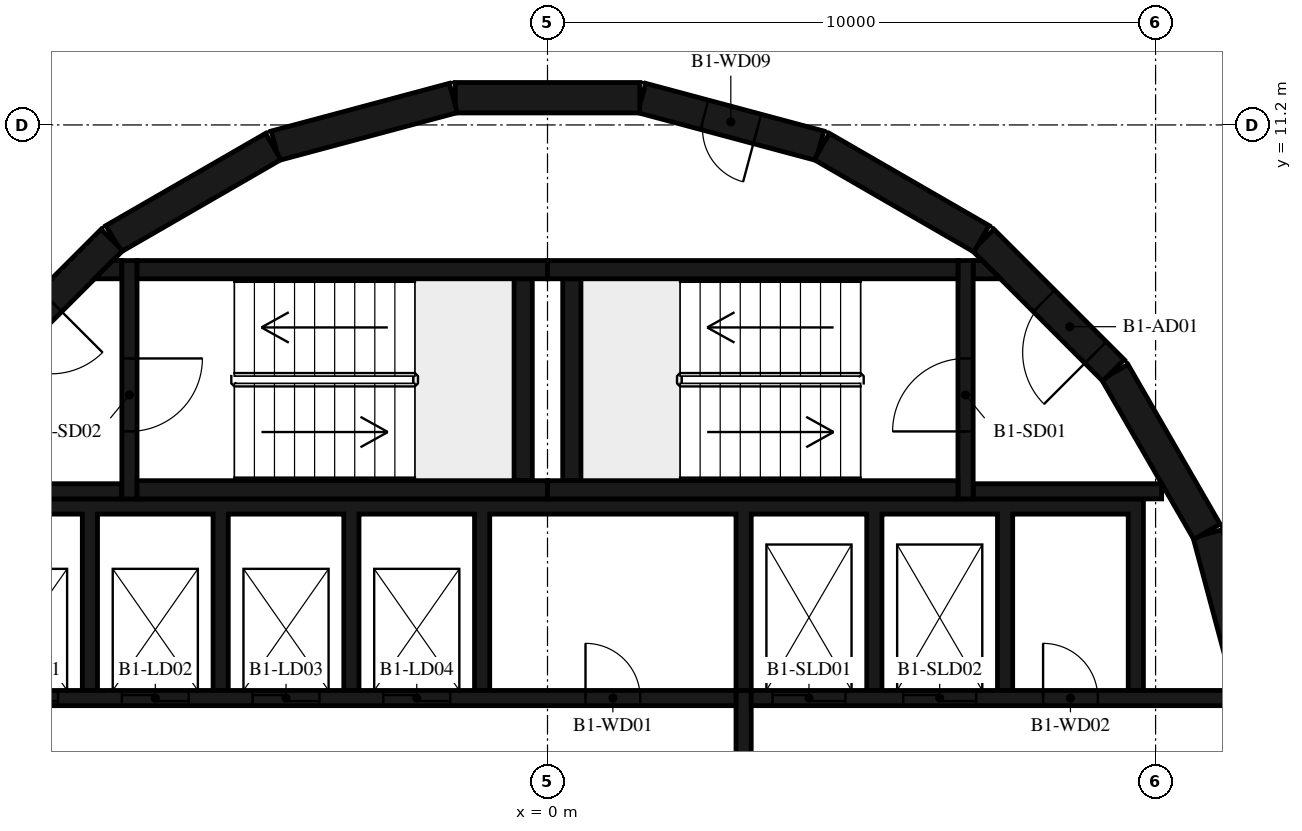
"""IFC4 building model, lengths in metres.
Left out: names, types, materials, properties, quantities, classifications, styles, units other than length and angle.
Written with IfcOpenShell. Run it as: python <this file> out.ifc"""

import sys

from ifc_helpers import new_model, si_unit, direction, frame, frame_2d, origin, place, context, subcontext, project, spatial, polyline, rectangle, outline, extrude, element, fill, save


model = new_model("IFC4")
c1 = context("Model", 3, precision=1e-05, world=origin(), true_north=direction((0.0, 1.0)))
c2 = subcontext(c1, "Body", "Model", "MODEL_VIEW")
j1 = project(units=[si_unit("LENGTHUNIT", "METRE"), si_unit("PLANEANGLEUNIT", "RADIAN")], contexts=[c1])
p1 = place(None, origin())
s1 = spatial("IfcSite", under=j1, at=p1, CompositionType="ELEMENT")
p2 = place(p1, origin())
s2 = spatial("IfcBuilding", under=s1, at=p2, CompositionType="ELEMENT")
p3 = place(p2, frame((0.0, 0.0, -4.2)))
s3 = spatial("IfcBuildingStorey", under=s2, at=p3, CompositionType="ELEMENT", Elevation=-4.2)
for number, where, z_axis, x_axis in (
    (1, (11.643, 1.55, 0.0), (0.0, 0.0, 1.0), (-0.259, 0.966, 0.0)),
    (2, (10.845, 4.51, 0.0), (0.0, 0.0, 1.0), (-0.5, 0.866, 0.0)),
):
    element("IfcWall", number, at=place(p3, frame(where, z_axis=z_axis, x_axis=x_axis)), inside=s3, PredefinedType="SHEAR", context=c2, shape_type="SweptSolid", body=[
        extrude(rectangle(XDim=3.033, YDim=0.5, at=frame_2d((1.516, 0.0))), origin(), (0.0, 0.0, 1.0), 3.78),
    ])
p4 = place(p3, frame((9.308, 7.164, 0.0), z_axis=(0.0, 0.0, 1.0), x_axis=(-0.707106781187, 0.707106781187, 0.0)))
e3 = element("IfcWall", 3, at=p4, inside=s3, PredefinedType="SHEAR", context=c2, shape_type="SweptSolid", body=[
    extrude(rectangle(XDim=3.032, YDim=0.5, at=frame_2d((1.516, 0.0))), origin(), (0.0, 0.0, 1.0), 3.78),
])
p5 = place(p4, frame((0.416, 0.0, 0.0)))
e4 = element("IfcOpeningElement", 4, at=p5, cuts=e3, PredefinedType="OPENING", context=c2, shape_type="SweptSolid", body=[
    extrude(rectangle(XDim=1.2, YDim=2.1, at=frame_2d((0.6, 1.05))), frame((0.0, 0.26, 0.0), z_axis=(0.0, -1.0, 0.0), x_axis=(1.0, 0.0, 0.0)), (0.0, 0.0, 1.0), 0.52),
])
p6 = place(p3, frame((7.137, 9.329, 0.0), z_axis=(0.0, 0.0, 1.0), x_axis=(-0.865975092491, 0.500087131594, 0.0)))
e5 = element("IfcWall", 5, at=p6, inside=s3, PredefinedType="SHEAR", context=c2, shape_type="SweptSolid", body=[
    extrude(rectangle(XDim=3.033, YDim=0.5, at=frame_2d((1.516, 0.0))), origin(), (0.0, 0.0, 1.0), 3.78),
])
p7 = place(p3, frame((4.479, 10.858, 0.0), z_axis=(0.0, 0.0, 1.0), x_axis=(-0.965948410781, 0.258734743916, 0.0)))
e6 = element("IfcWall", 6, at=p7, inside=s3, PredefinedType="SHEAR", context=c2, shape_type="SweptSolid", body=[
    extrude(rectangle(XDim=3.033, YDim=0.5, at=frame_2d((1.516, 0.0))), origin(), (0.0, 0.0, 1.0), 3.78),
])
p8 = place(p7, frame((1.066, 0.0, 0.0)))
e7 = element("IfcOpeningElement", 7, at=p8, cuts=e6, PredefinedType="OPENING", context=c2, shape_type="SweptSolid", body=[
    extrude(rectangle(XDim=0.9, YDim=2.1, at=frame_2d((0.45, 1.05))), frame((0.0, 0.26, 0.0), z_axis=(0.0, -1.0, 0.0), x_axis=(1.0, 0.0, 0.0)), (0.0, 0.0, 1.0), 0.52),
])
for number, where, z_axis, x_axis in (
    (8, (1.516, 11.647, 0.0), (0.0, 0.0, 1.0), (-1.0, 0.0, 0.0)),
    (9, (-1.55, 11.643, 0.0), (0.0, 0.0, 1.0), (-0.966, -0.259, 0.0)),
    (10, (-4.51, 10.845, 0.0), (0.0, 0.0, 1.0), (-0.866, -0.5, 0.0)),
):
    element("IfcWall", number, at=place(p3, frame(where, z_axis=z_axis, x_axis=x_axis)), inside=s3, PredefinedType="SHEAR", context=c2, shape_type="SweptSolid", body=[
        extrude(rectangle(XDim=3.033, YDim=0.5, at=frame_2d((1.516, 0.0))), origin(), (0.0, 0.0, 1.0), 3.78),
    ])
p9 = place(p3, frame((-7.164, 9.308, 0.0), z_axis=(0.0, 0.0, 1.0), x_axis=(-0.707106781187, -0.707106781187, 0.0)))
e11 = element("IfcWall", 11, at=p9, inside=s3, PredefinedType="SHEAR", context=c2, shape_type="SweptSolid", body=[
    extrude(rectangle(XDim=3.032, YDim=0.5, at=frame_2d((1.516, 0.0))), origin(), (0.0, 0.0, 1.0), 3.78),
])
p10 = place(p9, frame((1.416, 0.0, 0.0)))
e12 = element("IfcOpeningElement", 12, at=p10, cuts=e11, PredefinedType="OPENING", context=c2, shape_type="SweptSolid", body=[
    extrude(rectangle(XDim=1.2, YDim=2.1, at=frame_2d((0.6, 1.05))), frame((0.0, 0.26, 0.0), z_axis=(0.0, -1.0, 0.0), x_axis=(1.0, 0.0, 0.0)), (0.0, 0.0, 1.0), 0.52),
])
for number, where, z_axis, x_axis in (
    (13, (0.0, 5.2, 0.0), (0.0, 0.0, 1.0), (1.0, 0.0, 0.0)),
    (14, (0.0, 8.82, 0.0), (0.0, 0.0, 1.0), (1.0, 0.0, 0.0)),
):
    element("IfcWall", number, at=place(p3, frame(where, z_axis=z_axis, x_axis=x_axis)), inside=s3, PredefinedType="SHEAR", context=c2, shape_type="SweptSolid", body=[
        extrude(rectangle(XDim=6.75, YDim=0.3, at=frame_2d((3.375, 0.0))), origin(), (0.0, 0.0, 1.0), 3.78),
    ])
p11 = place(p3, frame((0.4, 5.35, 0.0), z_axis=(0.0, 0.0, 1.0), x_axis=(0.0, 1.0, 0.0)))
e15 = element("IfcWall", 15, at=p11, inside=s3, PredefinedType="SHEAR", context=c2, shape_type="SweptSolid", body=[
    extrude(rectangle(XDim=3.32, YDim=0.3, at=frame_2d((1.66, 0.0))), origin(), (0.0, 0.0, 1.0), 3.78),
])
p12 = place(p3, frame((6.875, 5.05, 0.0), z_axis=(0.0, 0.0, 1.0), x_axis=(0.0, 1.0, 0.0)))
e16 = element("IfcWall", 16, at=p12, inside=s3, PredefinedType="SHEAR", context=c2, shape_type="SweptSolid", body=[
    extrude(rectangle(XDim=3.92, YDim=0.25, at=frame_2d((1.96, 0.0))), origin(), (0.0, 0.0, 1.0), 3.78),
])
p13 = place(p12, frame((1.11, 0.0, 0.0)))
e17 = element("IfcOpeningElement", 17, at=p13, cuts=e16, PredefinedType="OPENING", context=c2, shape_type="SweptSolid", body=[
    extrude(rectangle(XDim=1.2, YDim=2.1, at=frame_2d((0.6, 1.05))), frame((0.0, 0.135, 0.0), z_axis=(0.0, -1.0, 0.0), x_axis=(1.0, 0.0, 0.0)), (0.0, 0.0, 1.0), 0.27),
])
p14 = place(p3, frame((7.0, 5.175, 0.0), z_axis=(0.0, 0.0, 1.0), x_axis=(1.0, 0.0, 0.0)))
e18 = element("IfcWall", 18, at=p14, inside=s3, PredefinedType="SHEAR", context=c2, shape_type="SweptSolid", body=[
    extrude(rectangle(XDim=3.1, YDim=0.25, at=frame_2d((1.55, 0.0))), origin(), (0.0, 0.0, 1.0), 3.78),
])
p15 = place(p3, origin())
e19 = element("IfcWall", 19, at=p15, inside=s3, PredefinedType="SHEAR", context=c2, shape_type="SweptSolid", body=[
    extrude(outline(polyline([(7.448, 8.67), (7.0, 8.67), (7.0, 8.97), (7.148, 8.97), (7.448, 8.67)])), origin(), (0.0, 0.0, 1.0), 3.78),
])
for number, where, z_axis, x_axis in (
    (20, (-6.75, 5.2, 0.0), (0.0, 0.0, 1.0), (1.0, 0.0, 0.0)),
    (21, (-6.75, 8.82, 0.0), (0.0, 0.0, 1.0), (1.0, 0.0, 0.0)),
):
    element("IfcWall", number, at=place(p3, frame(where, z_axis=z_axis, x_axis=x_axis)), inside=s3, PredefinedType="SHEAR", context=c2, shape_type="SweptSolid", body=[
        extrude(rectangle(XDim=6.75, YDim=0.3, at=frame_2d((3.375, 0.0))), origin(), (0.0, 0.0, 1.0), 3.78),
    ])
p16 = place(p3, frame((-0.4, 5.35, 0.0), z_axis=(0.0, 0.0, 1.0), x_axis=(0.0, 1.0, 0.0)))
e22 = element("IfcWall", 22, at=p16, inside=s3, PredefinedType="SHEAR", context=c2, shape_type="SweptSolid", body=[
    extrude(rectangle(XDim=3.32, YDim=0.3, at=frame_2d((1.66, 0.0))), origin(), (0.0, 0.0, 1.0), 3.78),
])
p17 = place(p3, frame((-6.875, 8.97, 0.0), z_axis=(0.0, 0.0, 1.0), x_axis=(0.0, -1.0, 0.0)))
e23 = element("IfcWall", 23, at=p17, inside=s3, PredefinedType="SHEAR", context=c2, shape_type="SweptSolid", body=[
    extrude(rectangle(XDim=3.92, YDim=0.25, at=frame_2d((1.96, 0.0))), origin(), (0.0, 0.0, 1.0), 3.78),
])
p18 = place(p17, frame((1.61, 0.0, 0.0)))
e24 = element("IfcOpeningElement", 24, at=p18, cuts=e23, PredefinedType="OPENING", context=c2, shape_type="SweptSolid", body=[
    extrude(rectangle(XDim=1.2, YDim=2.1, at=frame_2d((0.6, 1.05))), frame((0.0, 0.135, 0.0), z_axis=(0.0, -1.0, 0.0), x_axis=(1.0, 0.0, 0.0)), (0.0, 0.0, 1.0), 0.27),
])
p19 = place(p3, frame((-7.0, 5.175, 0.0), z_axis=(0.0, 0.0, 1.0), x_axis=(-1.0, 0.0, 0.0)))
e25 = element("IfcWall", 25, at=p19, inside=s3, PredefinedType="SHEAR", context=c2, shape_type="SweptSolid", body=[
    extrude(rectangle(XDim=3.1, YDim=0.25, at=frame_2d((1.55, 0.0))), origin(), (0.0, 0.0, 1.0), 3.78),
])
p20 = place(p3, origin())
e26 = element("IfcWall", 26, at=p20, inside=s3, PredefinedType="SHEAR", context=c2, shape_type="SweptSolid", body=[
    extrude(outline(polyline([(-7.148, 8.97), (-7.0, 8.97), (-7.0, 8.67), (-7.448, 8.67), (-7.148, 8.97)])), origin(), (0.0, 0.0, 1.0), 3.78),
])
p21 = place(p3, origin())
e27 = element("IfcWall", 27, at=p21, inside=s3, PredefinedType="SHEAR", context=c2, shape_type="SweptSolid", body=[
    extrude(outline(polyline([(-9.55, 4.8), (-7.65, 4.8), (-7.65, 1.9), (-7.4, 1.9), (-7.4, 4.8), (-5.5, 4.8), (-5.5, 1.9), (-5.25, 1.9), (-5.25, 4.8), (-3.35, 4.8), (-3.35, 1.9), (-3.1, 1.9), (-3.1, 4.8), (-1.2, 4.8), (-1.2, 1.9), (-0.95, 1.9), (-0.95, 4.8), (3.1, 4.8), (3.1, 1.9), (3.35, 1.9), (3.35, 4.8), (5.25, 4.8), (5.25, 1.9), (5.5, 1.9), (5.5, 4.8), (7.4, 4.8), (7.4, 1.9), (7.65, 1.9), (7.65, 4.8), (9.55, 4.8), (9.55, 1.9), (9.8, 1.9), (9.8, 4.8), (9.8, 5.05), (-9.8, 5.05), (-9.8, 4.8), (-9.8, 1.9), (-9.55, 1.9), (-9.55, 4.8)])), origin(), (0.0, 0.0, 1.0), 3.78),
])
p22 = place(p3, frame((-11.28, 1.775, 0.0), z_axis=(0.0, 0.0, 1.0), x_axis=(1.0, 0.0, 0.0)))
e28 = element("IfcWall", 28, at=p22, inside=s3, PredefinedType="SHEAR", context=c2, shape_type="SweptSolid", body=[
    extrude(rectangle(XDim=14.38, YDim=0.25, at=frame_2d((7.19, 0.0))), origin(), (0.0, 0.0, 1.0), 3.78),
])
p23 = place(p22, frame((2.13, 0.0, 0.0)))
e29 = element("IfcOpeningElement", 29, at=p23, cuts=e28, PredefinedType="OPENING", context=c2, shape_type="SweptSolid", body=[
    extrude(rectangle(XDim=1.1, YDim=2.1, at=frame_2d((0.55, 1.05))), frame((0.0, 0.135, 0.0), z_axis=(0.0, -1.0, 0.0), x_axis=(1.0, 0.0, 0.0)), (0.0, 0.0, 1.0), 0.27),
])
p24 = place(p22, frame((4.28, 0.0, 0.0)))
e30 = element("IfcOpeningElement", 30, at=p24, cuts=e28, PredefinedType="OPENING", context=c2, shape_type="SweptSolid", body=[
    extrude(rectangle(XDim=1.1, YDim=2.1, at=frame_2d((0.55, 1.05))), frame((0.0, 0.135, 0.0), z_axis=(0.0, -1.0, 0.0), x_axis=(1.0, 0.0, 0.0)), (0.0, 0.0, 1.0), 0.27),
])
p25 = place(p22, frame((6.43, 0.0, 0.0)))
e31 = element("IfcOpeningElement", 31, at=p25, cuts=e28, PredefinedType="OPENING", context=c2, shape_type="SweptSolid", body=[
    extrude(rectangle(XDim=1.1, YDim=2.1, at=frame_2d((0.55, 1.05))), frame((0.0, 0.135, 0.0), z_axis=(0.0, -1.0, 0.0), x_axis=(1.0, 0.0, 0.0)), (0.0, 0.0, 1.0), 0.27),
])
p26 = place(p22, frame((8.58, 0.0, 0.0)))
e32 = element("IfcOpeningElement", 32, at=p26, cuts=e28, PredefinedType="OPENING", context=c2, shape_type="SweptSolid", body=[
    extrude(rectangle(XDim=1.1, YDim=2.1, at=frame_2d((0.55, 1.05))), frame((0.0, 0.135, 0.0), z_axis=(0.0, -1.0, 0.0), x_axis=(1.0, 0.0, 0.0)), (0.0, 0.0, 1.0), 0.27),
])
p27 = place(p22, frame((11.905, 0.0, 0.0)))
e33 = element("IfcOpeningElement", 33, at=p27, cuts=e28, PredefinedType="OPENING", context=c2, shape_type="SweptSolid", body=[
    extrude(rectangle(XDim=0.9, YDim=2.1, at=frame_2d((0.45, 1.05))), frame((0.0, 0.135, 0.0), z_axis=(0.0, -1.0, 0.0), x_axis=(1.0, 0.0, 0.0)), (0.0, 0.0, 1.0), 0.27),
])
p28 = place(p3, frame((3.35, 1.775, 0.0), z_axis=(0.0, 0.0, 1.0), x_axis=(1.0, 0.0, 0.0)))
e34 = element("IfcWall", 34, at=p28, inside=s3, PredefinedType="SHEAR", context=c2, shape_type="SweptSolid", body=[
    extrude(rectangle(XDim=7.93, YDim=0.25, at=frame_2d((3.965, 0.0))), origin(), (0.0, 0.0, 1.0), 3.78),
])
p29 = place(p28, frame((0.35, 0.0, 0.0)))
e35 = element("IfcOpeningElement", 35, at=p29, cuts=e34, PredefinedType="OPENING", context=c2, shape_type="SweptSolid", body=[
    extrude(rectangle(XDim=1.2, YDim=2.4, at=frame_2d((0.6, 1.2))), frame((0.0, 0.135, 0.0), z_axis=(0.0, -1.0, 0.0), x_axis=(1.0, 0.0, 0.0)), (0.0, 0.0, 1.0), 0.27),
])
p30 = place(p28, frame((2.5, 0.0, 0.0)))
e36 = element("IfcOpeningElement", 36, at=p30, cuts=e34, PredefinedType="OPENING", context=c2, shape_type="SweptSolid", body=[
    extrude(rectangle(XDim=1.2, YDim=2.4, at=frame_2d((0.6, 1.2))), frame((0.0, 0.135, 0.0), z_axis=(0.0, -1.0, 0.0), x_axis=(1.0, 0.0, 0.0)), (0.0, 0.0, 1.0), 0.27),
])
p31 = place(p28, frame((4.8, 0.0, 0.0)))
e37 = element("IfcOpeningElement", 37, at=p31, cuts=e34, PredefinedType="OPENING", context=c2, shape_type="SweptSolid", body=[
    extrude(rectangle(XDim=0.9, YDim=2.1, at=frame_2d((0.45, 1.05))), frame((0.0, 0.135, 0.0), z_axis=(0.0, -1.0, 0.0), x_axis=(1.0, 0.0, 0.0)), (0.0, 0.0, 1.0), 0.27),
])
p32 = place(p3, frame((3.225, -1.9, 0.0), z_axis=(0.0, 0.0, 1.0), x_axis=(0.0, 1.0, 0.0)))
e38 = element("IfcWall", 38, at=p32, inside=s3, PredefinedType="SHEAR", context=c2, shape_type="SweptSolid", body=[
    extrude(rectangle(XDim=3.8, YDim=0.25, at=frame_2d((1.9, 0.0))), origin(), (0.0, 0.0, 1.0), 3.78),
])
p33 = place(p13, origin())
e39 = element("IfcDoor", 39, at=p33, inside=s3, OperationType="SINGLE_SWING_LEFT", PredefinedType="DOOR", context=c2, shape_type="SweptSolid", body=[
    extrude(rectangle(XDim=1.2, YDim=2.1, at=frame_2d((0.6, 1.05))), frame((0.0, 0.025, 0.0), z_axis=(0.0, -1.0, 0.0), x_axis=(1.0, 0.0, 0.0)), (0.0, 0.0, 1.0), 0.05),
])
fill(e17, e39)
p34 = place(p5, origin())
e40 = element("IfcDoor", 40, at=p34, inside=s3, OperationType="SINGLE_SWING_RIGHT", PredefinedType="DOOR", context=c2, shape_type="SweptSolid", body=[
    extrude(rectangle(XDim=1.2, YDim=2.1, at=frame_2d((0.6, 1.05))), frame((0.0, 0.025, 0.0), z_axis=(0.0, -1.0, 0.0), x_axis=(1.0, 0.0, 0.0)), (0.0, 0.0, 1.0), 0.05),
])
fill(e4, e40)
p35 = place(p18, origin())
e41 = element("IfcDoor", 41, at=p35, inside=s3, OperationType="SINGLE_SWING_LEFT", PredefinedType="DOOR", context=c2, shape_type="SweptSolid", body=[
    extrude(rectangle(XDim=1.2, YDim=2.1, at=frame_2d((0.6, 1.05))), frame((0.0, 0.025, 0.0), z_axis=(0.0, -1.0, 0.0), x_axis=(1.0, 0.0, 0.0)), (0.0, 0.0, 1.0), 0.05),
])
fill(e24, e41)
p36 = place(p10, origin())
e42 = element("IfcDoor", 42, at=p36, inside=s3, OperationType="SINGLE_SWING_RIGHT", PredefinedType="DOOR", context=c2, shape_type="SweptSolid", body=[
    extrude(rectangle(XDim=1.2, YDim=2.1, at=frame_2d((0.6, 1.05))), frame((0.0, 0.025, 0.0), z_axis=(0.0, -1.0, 0.0), x_axis=(1.0, 0.0, 0.0)), (0.0, 0.0, 1.0), 0.05),
])
fill(e12, e42)
p37 = place(p23, origin())
e43 = element("IfcDoor", 43, at=p37, inside=s3, OperationType="DOUBLE_DOOR_SLIDING", PredefinedType="DOOR", context=c2, shape_type="SweptSolid", body=[
    extrude(rectangle(XDim=1.1, YDim=2.1, at=frame_2d((0.55, 1.05))), frame((0.0, 0.025, 0.0), z_axis=(0.0, -1.0, 0.0), x_axis=(1.0, 0.0, 0.0)), (0.0, 0.0, 1.0), 0.05),
])
fill(e29, e43)
p38 = place(p24, origin())
e44 = element("IfcDoor", 44, at=p38, inside=s3, OperationType="DOUBLE_DOOR_SLIDING", PredefinedType="DOOR", context=c2, shape_type="SweptSolid", body=[
    extrude(rectangle(XDim=1.1, YDim=2.1, at=frame_2d((0.55, 1.05))), frame((0.0, 0.025, 0.0), z_axis=(0.0, -1.0, 0.0), x_axis=(1.0, 0.0, 0.0)), (0.0, 0.0, 1.0), 0.05),
])
fill(e30, e44)
p39 = place(p25, origin())
e45 = element("IfcDoor", 45, at=p39, inside=s3, OperationType="DOUBLE_DOOR_SLIDING", PredefinedType="DOOR", context=c2, shape_type="SweptSolid", body=[
    extrude(rectangle(XDim=1.1, YDim=2.1, at=frame_2d((0.55, 1.05))), frame((0.0, 0.025, 0.0), z_axis=(0.0, -1.0, 0.0), x_axis=(1.0, 0.0, 0.0)), (0.0, 0.0, 1.0), 0.05),
])
fill(e31, e45)
p40 = place(p26, origin())
e46 = element("IfcDoor", 46, at=p40, inside=s3, OperationType="DOUBLE_DOOR_SLIDING", PredefinedType="DOOR", context=c2, shape_type="SweptSolid", body=[
    extrude(rectangle(XDim=1.1, YDim=2.1, at=frame_2d((0.55, 1.05))), frame((0.0, 0.025, 0.0), z_axis=(0.0, -1.0, 0.0), x_axis=(1.0, 0.0, 0.0)), (0.0, 0.0, 1.0), 0.05),
])
fill(e32, e46)
p41 = place(p29, origin())
e47 = element("IfcDoor", 47, at=p41, inside=s3, OperationType="DOUBLE_DOOR_SLIDING", PredefinedType="DOOR", context=c2, shape_type="SweptSolid", body=[
    extrude(rectangle(XDim=1.2, YDim=2.4, at=frame_2d((0.6, 1.2))), frame((0.0, 0.025, 0.0), z_axis=(0.0, -1.0, 0.0), x_axis=(1.0, 0.0, 0.0)), (0.0, 0.0, 1.0), 0.05),
])
fill(e35, e47)
p42 = place(p30, origin())
e48 = element("IfcDoor", 48, at=p42, inside=s3, OperationType="DOUBLE_DOOR_SLIDING", PredefinedType="DOOR", context=c2, shape_type="SweptSolid", body=[
    extrude(rectangle(XDim=1.2, YDim=2.4, at=frame_2d((0.6, 1.2))), frame((0.0, 0.025, 0.0), z_axis=(0.0, -1.0, 0.0), x_axis=(1.0, 0.0, 0.0)), (0.0, 0.0, 1.0), 0.05),
])
fill(e36, e48)
p43 = place(p27, origin())
e49 = element("IfcDoor", 49, at=p43, inside=s3, OperationType="SINGLE_SWING_RIGHT", PredefinedType="DOOR", context=c2, shape_type="SweptSolid", body=[
    extrude(rectangle(XDim=0.9, YDim=2.1, at=frame_2d((0.45, 1.05))), frame((0.0, 0.025, 0.0), z_axis=(0.0, -1.0, 0.0), x_axis=(1.0, 0.0, 0.0)), (0.0, 0.0, 1.0), 0.05),
])
fill(e33, e49)
p44 = place(p31, origin())
e50 = element("IfcDoor", 50, at=p44, inside=s3, OperationType="SINGLE_SWING_LEFT", PredefinedType="DOOR", context=c2, shape_type="SweptSolid", body=[
    extrude(rectangle(XDim=0.9, YDim=2.1, at=frame_2d((0.45, 1.05))), frame((0.0, 0.025, 0.0), z_axis=(0.0, -1.0, 0.0), x_axis=(1.0, 0.0, 0.0)), (0.0, 0.0, 1.0), 0.05),
])
fill(e37, e50)
p45 = place(p8, origin())
e51 = element("IfcDoor", 51, at=p45, inside=s3, OperationType="SINGLE_SWING_RIGHT", PredefinedType="DOOR", context=c2, shape_type="SweptSolid", body=[
    extrude(rectangle(XDim=0.9, YDim=2.1, at=frame_2d((0.45, 1.05))), frame((0.0, 0.025, 0.0), z_axis=(0.0, -1.0, 0.0), x_axis=(1.0, 0.0, 0.0)), (0.0, 0.0, 1.0), 0.05),
])
fill(e7, e51)
save(model, sys.argv[1])
